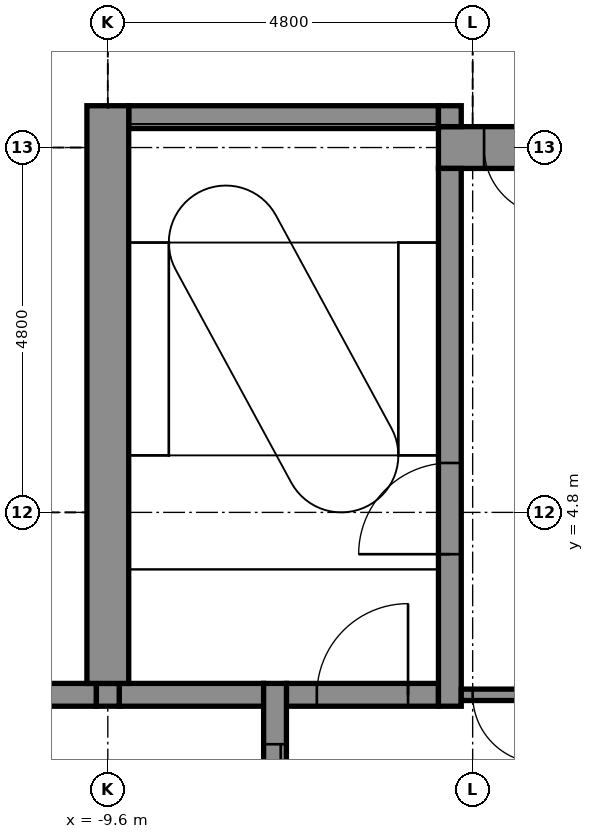
"""IFC4 building model, lengths in metres.
Left out: names, types, materials, properties, quantities, classifications, styles, units other than length and angle.
Written with IfcOpenShell. Run it as: python <this file> out.ifc"""

import sys

from ifc_helpers import new_model, si_unit, direction, frame, frame_2d, origin, place, context, subcontext, project, spatial, rectangle, extrude, element, fill, save


model = new_model("IFC4")
c1 = context("Model", 3, precision=1e-05, world=origin(), true_north=direction((0.0, 1.0)))
c2 = subcontext(c1, "Body", "Model", "MODEL_VIEW")
j1 = project(units=[si_unit("LENGTHUNIT", "METRE"), si_unit("PLANEANGLEUNIT", "RADIAN")], contexts=[c1])
p1 = place(None, origin())
s1 = spatial("IfcSite", under=j1, at=p1, CompositionType="ELEMENT")
p2 = place(p1, origin())
s2 = spatial("IfcBuilding", under=s1, at=p2, CompositionType="ELEMENT")
p3 = place(p2, frame((0.0, 0.0, 222.8)))
s3 = spatial("IfcBuildingStorey", under=s2, at=p3, CompositionType="ELEMENT", Elevation=222.8)
p4 = place(p3, frame((-10.85, 2.4, -0.15), z_axis=(0.0, 0.0, 1.0), x_axis=(1.0, 0.0, 0.0)))
e1 = element("IfcWall", 1, at=p4, inside=s3, PredefinedType="STANDARD", context=c2, shape_type="SweptSolid", body=[
    extrude(rectangle(XDim=1.1, YDim=0.3, at=frame_2d((0.55, 0.0))), origin(), (0.0, 0.0, 1.0), 3.9),
])
p5 = place(p3, frame((-9.45, 2.4, -0.15), z_axis=(0.0, 0.0, 1.0), x_axis=(1.0, 0.0, 0.0)))
e2 = element("IfcWall", 2, at=p5, inside=s3, PredefinedType="STANDARD", context=c2, shape_type="SweptSolid", body=[
    extrude(rectangle(XDim=1.9, YDim=0.3, at=frame_2d((0.95, 0.0))), origin(), (0.0, 0.0, 1.0), 3.9),
])
p6 = place(p3, frame((-7.25, 2.4, -0.15), z_axis=(0.0, 0.0, 1.0), x_axis=(1.0, 0.0, 0.0)))
e3 = element("IfcWall", 3, at=p6, inside=s3, PredefinedType="STANDARD", context=c2, shape_type="SweptSolid", body=[
    extrude(rectangle(XDim=2.0, YDim=0.3, at=frame_2d((1.0, 0.0))), origin(), (0.0, 0.0, 1.0), 3.9),
])
p7 = place(p6, frame((0.4, 0.0, 0.15)))
e4 = element("IfcOpeningElement", 4, at=p7, cuts=e3, PredefinedType="OPENING", context=c2, shape_type="SweptSolid", body=[
    extrude(rectangle(XDim=1.2, YDim=2.1, at=frame_2d((0.6, 1.05))), frame((0.0, 0.16, 0.0), z_axis=(0.0, -1.0, 0.0), x_axis=(1.0, 0.0, 0.0)), (0.0, 0.0, 1.0), 0.32),
])
p8 = place(p3, frame((-5.25, 9.6, -0.15), z_axis=(0.0, 0.0, 1.0), x_axis=(1.0, 0.0, 0.0)))
e5 = element("IfcWall", 5, at=p8, inside=s3, PredefinedType="SHEAR", context=c2, shape_type="SweptSolid", body=[
    extrude(rectangle(XDim=14.575, YDim=0.55, at=frame_2d((7.288, 0.0))), origin(), (0.0, 0.0, 1.0), 3.9),
])
p9 = place(p8, frame((0.6, 0.0, 0.15)))
e6 = element("IfcOpeningElement", 6, at=p9, cuts=e5, PredefinedType="OPENING", context=c2, shape_type="SweptSolid", body=[
    extrude(rectangle(XDim=0.9, YDim=2.1, at=frame_2d((0.45, 1.05))), frame((0.0, 0.285, 0.0), z_axis=(0.0, -1.0, 0.0), x_axis=(1.0, 0.0, 0.0)), (0.0, 0.0, 1.0), 0.57),
])
p10 = place(p3, frame((-9.325, 10.0, -0.15), z_axis=(0.0, 0.0, 1.0), x_axis=(1.0, 0.0, 0.0)))
e7 = element("IfcWall", 7, at=p10, inside=s3, PredefinedType="STANDARD", context=c2, shape_type="SweptSolid", body=[
    extrude(rectangle(XDim=4.075, YDim=0.3, at=frame_2d((2.038, 0.0))), origin(), (0.0, 0.0, 1.0), 3.9),
])
p11 = place(p3, frame((-9.6, 2.25, -0.15), z_axis=(0.0, 0.0, 1.0), x_axis=(0.0, 1.0, 0.0)))
e8 = element("IfcWall", 8, at=p11, inside=s3, PredefinedType="STANDARD", context=c2, shape_type="SweptSolid", body=[
    extrude(rectangle(XDim=0.3, YDim=0.3, at=frame_2d((0.15, 0.0))), origin(), (0.0, 0.0, 1.0), 3.9),
])
p12 = place(p3, frame((-9.6, 2.55, -0.15), z_axis=(0.0, 0.0, 1.0), x_axis=(0.0, 1.0, 0.0)))
e9 = element("IfcWall", 9, at=p12, inside=s3, PredefinedType="SHEAR", context=c2, shape_type="SweptSolid", body=[
    extrude(rectangle(XDim=7.6, YDim=0.55, at=frame_2d((3.8, 0.0))), origin(), (0.0, 0.0, 1.0), 3.9),
])
p13 = place(p3, frame((-7.4, -2.55, -0.15), z_axis=(0.0, 0.0, 1.0), x_axis=(0.0, 1.0, 0.0)))
e10 = element("IfcWall", 10, at=p13, inside=s3, PredefinedType="STANDARD", context=c2, shape_type="SweptSolid", body=[
    extrude(rectangle(XDim=5.1, YDim=0.3, at=frame_2d((2.55, 0.0))), origin(), (0.0, 0.0, 1.0), 3.9),
])
p14 = place(p13, frame((0.8, 0.0, 0.15)))
e11 = element("IfcOpeningElement", 11, at=p14, cuts=e10, PredefinedType="OPENING", context=c2, shape_type="SweptSolid", body=[
    extrude(rectangle(XDim=1.1, YDim=2.1, at=frame_2d((0.55, 1.05))), frame((0.0, 0.16, 0.0), z_axis=(0.0, -1.0, 0.0), x_axis=(1.0, 0.0, 0.0)), (0.0, 0.0, 1.0), 0.32),
])
p15 = place(p13, frame((3.2, 0.0, 0.15)))
e12 = element("IfcOpeningElement", 12, at=p15, cuts=e10, PredefinedType="OPENING", context=c2, shape_type="SweptSolid", body=[
    extrude(rectangle(XDim=1.1, YDim=2.1, at=frame_2d((0.55, 1.05))), frame((0.0, 0.16, 0.0), z_axis=(0.0, -1.0, 0.0), x_axis=(1.0, 0.0, 0.0)), (0.0, 0.0, 1.0), 0.32),
])
p16 = place(p3, frame((-5.1, 2.25, -0.15), z_axis=(0.0, 0.0, 1.0), x_axis=(0.0, 1.0, 0.0)))
e13 = element("IfcWall", 13, at=p16, inside=s3, PredefinedType="STANDARD", context=c2, shape_type="SweptSolid", body=[
    extrude(rectangle(XDim=7.075, YDim=0.3, at=frame_2d((3.538, 0.0))), origin(), (0.0, 0.0, 1.0), 3.9),
])
p17 = place(p16, frame((2.0, 0.0, 0.15)))
e14 = element("IfcOpeningElement", 14, at=p17, cuts=e13, PredefinedType="OPENING", context=c2, shape_type="SweptSolid", body=[
    extrude(rectangle(XDim=1.2, YDim=2.1, at=frame_2d((0.6, 1.05))), frame((0.0, 0.16, 0.0), z_axis=(0.0, -1.0, 0.0), x_axis=(1.0, 0.0, 0.0)), (0.0, 0.0, 1.0), 0.32),
])
p18 = place(p3, frame((-5.1, 9.875, -0.15), z_axis=(0.0, 0.0, 1.0), x_axis=(0.0, 1.0, 0.0)))
e15 = element("IfcWall", 15, at=p18, inside=s3, PredefinedType="STANDARD", context=c2, shape_type="SweptSolid", body=[
    extrude(rectangle(XDim=0.275, YDim=0.3, at=frame_2d((0.137, 0.0))), origin(), (0.0, 0.0, 1.0), 3.9),
])
p19 = place(p3, frame((-4.95, 2.4, 0.0), z_axis=(0.0, 0.0, 1.0), x_axis=(1.0, 0.0, 0.0)))
e16 = element("IfcWall", 16, at=p19, inside=s3, PredefinedType="PARTITIONING", context=c2, shape_type="SweptSolid", body=[
    extrude(rectangle(XDim=1.2, YDim=0.15, at=frame_2d((0.6, 0.0))), origin(), (0.0, 0.0, 1.0), 3.75),
])
p20 = place(p19, frame((0.15, 0.0, 0.0)))
e17 = element("IfcOpeningElement", 17, at=p20, cuts=e16, PredefinedType="OPENING", context=c2, shape_type="SweptSolid", body=[
    extrude(rectangle(XDim=0.9, YDim=2.1, at=frame_2d((0.45, 1.05))), frame((0.0, 0.085, 0.0), z_axis=(0.0, -1.0, 0.0), x_axis=(1.0, 0.0, 0.0)), (0.0, 0.0, 1.0), 0.17),
])
p21 = place(p15, origin())
e18 = element("IfcDoor", 18, at=p21, inside=s3, OperationType="DOUBLE_DOOR_SLIDING", PredefinedType="DOOR", context=c2, shape_type="SweptSolid", body=[
    extrude(rectangle(XDim=1.1, YDim=2.1, at=frame_2d((0.55, 1.05))), frame((0.0, 0.025, 0.0), z_axis=(0.0, -1.0, 0.0), x_axis=(1.0, 0.0, 0.0)), (0.0, 0.0, 1.0), 0.05),
])
fill(e12, e18)
p22 = place(p17, origin())
e19 = element("IfcDoor", 19, at=p22, inside=s3, OperationType="SINGLE_SWING_LEFT", PredefinedType="DOOR", context=c2, shape_type="SweptSolid", body=[
    extrude(rectangle(XDim=1.2, YDim=2.1, at=frame_2d((0.6, 1.05))), frame((0.0, 0.025, 0.0), z_axis=(0.0, -1.0, 0.0), x_axis=(1.0, 0.0, 0.0)), (0.0, 0.0, 1.0), 0.05),
])
fill(e14, e19)
p23 = place(p9, frame((0.9, 0.0, 0.0), z_axis=(0.0, 0.0, 1.0), x_axis=(-1.0, 0.0, 0.0)))
e20 = element("IfcDoor", 20, at=p23, inside=s3, OperationType="SINGLE_SWING_RIGHT", PredefinedType="DOOR", context=c2, shape_type="SweptSolid", body=[
    extrude(rectangle(XDim=0.9, YDim=2.1, at=frame_2d((0.45, 1.05))), frame((0.0, 0.025, 0.0), z_axis=(0.0, -1.0, 0.0), x_axis=(1.0, 0.0, 0.0)), (0.0, 0.0, 1.0), 0.05),
])
fill(e6, e20)
p24 = place(p20, frame((0.9, 0.0, 0.0), z_axis=(0.0, 0.0, 1.0), x_axis=(-1.0, 0.0, 0.0)))
e21 = element("IfcDoor", 21, at=p24, inside=s3, OperationType="SINGLE_SWING_RIGHT", PredefinedType="DOOR", context=c2, shape_type="SweptSolid", body=[
    extrude(rectangle(XDim=0.9, YDim=2.1, at=frame_2d((0.45, 1.05))), frame((0.0, 0.025, 0.0), z_axis=(0.0, -1.0, 0.0), x_axis=(1.0, 0.0, 0.0)), (0.0, 0.0, 1.0), 0.05),
])
fill(e17, e21)
p25 = place(p7, origin())
e22 = element("IfcDoor", 22, at=p25, inside=s3, OperationType="SINGLE_SWING_RIGHT", PredefinedType="DOOR", context=c2, shape_type="SweptSolid", body=[
    extrude(rectangle(XDim=1.2, YDim=2.1, at=frame_2d((0.6, 1.05))), frame((0.0, 0.025, 0.0), z_axis=(0.0, -1.0, 0.0), x_axis=(1.0, 0.0, 0.0)), (0.0, 0.0, 1.0), 0.05),
])
fill(e4, e22)
save(model, sys.argv[1])
